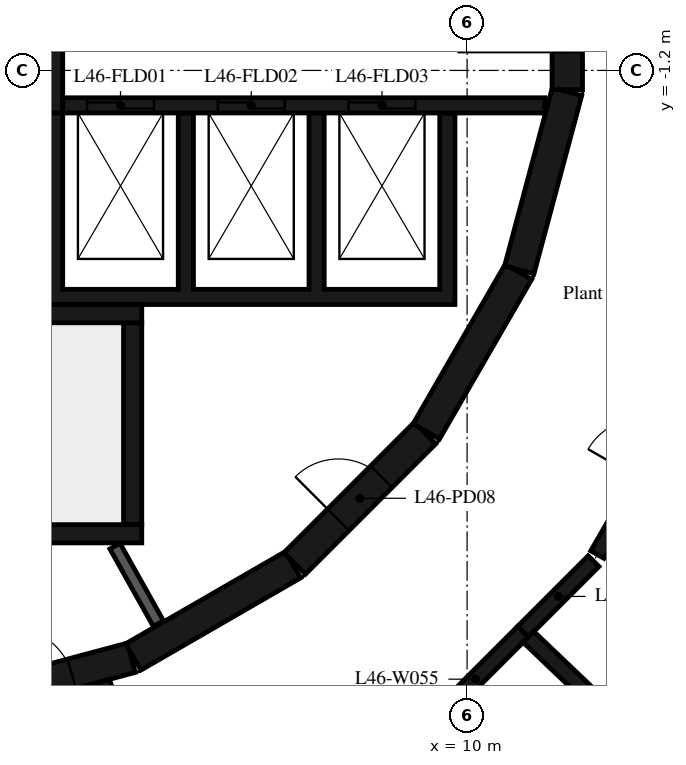
"""IFC4 building model, lengths in metres.
Left out: names, types, materials, properties, quantities, classifications, styles, units other than length and angle.
Written with IfcOpenShell. Run it as: python <this file> out.ifc"""

import sys

from ifc_helpers import new_model, si_unit, direction, frame, frame_2d, origin, place, context, subcontext, project, spatial, polyline, rectangle, outline, extrude, element, fill, save


model = new_model("IFC4")
c1 = context("Model", 3, precision=1e-05, world=origin(), true_north=direction((0.0, 1.0)))
c2 = subcontext(c1, "Body", "Model", "MODEL_VIEW")
j1 = project(units=[si_unit("LENGTHUNIT", "METRE"), si_unit("PLANEANGLEUNIT", "RADIAN")], contexts=[c1])
p1 = place(None, origin())
s1 = spatial("IfcSite", under=j1, at=p1, CompositionType="ELEMENT")
p2 = place(p1, origin())
s2 = spatial("IfcBuilding", under=s1, at=p2, CompositionType="ELEMENT")
p3 = place(p2, frame((0.0, 0.0, 183.2)))
s3 = spatial("IfcBuildingStorey", under=s2, at=p3, CompositionType="ELEMENT", Elevation=183.2)
p4 = place(p3, frame((1.55, -11.643, 0.0), z_axis=(0.0, 0.0, 1.0), x_axis=(0.965948410781, 0.258734743916, 0.0)))
e1 = element("IfcWall", 1, at=p4, inside=s3, PredefinedType="SHEAR", context=c2, shape_type="SweptSolid", body=[
    extrude(rectangle(XDim=3.033, YDim=0.5, at=frame_2d((1.516, 0.0))), origin(), (0.0, 0.0, 1.0), 4.75),
])
p5 = place(p4, frame((1.016, 0.0, 0.0)))
e2 = element("IfcOpeningElement", 2, at=p5, cuts=e1, PredefinedType="OPENING", context=c2, shape_type="SweptSolid", body=[
    extrude(rectangle(XDim=1.0, YDim=2.4, at=frame_2d((0.5, 1.2))), frame((0.0, 0.26, 0.0), z_axis=(0.0, -1.0, 0.0), x_axis=(1.0, 0.0, 0.0)), (0.0, 0.0, 1.0), 0.52),
])
p6 = place(p3, frame((4.51, -10.845, 0.0), z_axis=(0.0, 0.0, 1.0), x_axis=(0.865975092491, 0.500087131594, 0.0)))
e3 = element("IfcWall", 3, at=p6, inside=s3, PredefinedType="SHEAR", context=c2, shape_type="SweptSolid", body=[
    extrude(rectangle(XDim=3.033, YDim=0.5, at=frame_2d((1.516, 0.0))), origin(), (0.0, 0.0, 1.0), 4.75),
])
p7 = place(p3, frame((7.164, -9.308, 0.0), z_axis=(0.0, 0.0, 1.0), x_axis=(0.707106781187, 0.707106781187, 0.0)))
e4 = element("IfcWall", 4, at=p7, inside=s3, PredefinedType="SHEAR", context=c2, shape_type="SweptSolid", body=[
    extrude(rectangle(XDim=3.032, YDim=0.5, at=frame_2d((1.516, 0.0))), origin(), (0.0, 0.0, 1.0), 4.75),
])
p8 = place(p7, frame((1.016, 0.0, 0.0)))
e5 = element("IfcOpeningElement", 5, at=p8, cuts=e4, PredefinedType="OPENING", context=c2, shape_type="SweptSolid", body=[
    extrude(rectangle(XDim=1.0, YDim=2.4, at=frame_2d((0.5, 1.2))), frame((0.0, 0.26, 0.0), z_axis=(0.0, -1.0, 0.0), x_axis=(1.0, 0.0, 0.0)), (0.0, 0.0, 1.0), 0.52),
])
for number, where, z_axis, x_axis in (
    (6, (9.329, -7.137, 0.0), (0.0, 0.0, 1.0), (0.5, 0.866, 0.0)),
    (7, (10.858, -4.479, 0.0), (0.0, 0.0, 1.0), (0.259, 0.966, 0.0)),
):
    element("IfcWall", number, at=place(p3, frame(where, z_axis=z_axis, x_axis=x_axis)), inside=s3, PredefinedType="SHEAR", context=c2, shape_type="SweptSolid", body=[
        extrude(rectangle(XDim=3.033, YDim=0.5, at=frame_2d((1.516, 0.0))), origin(), (0.0, 0.0, 1.0), 4.75),
    ])
p9 = place(p3, frame((11.647, -1.516, 0.0), z_axis=(0.0, 0.0, 1.0), x_axis=(0.0, 1.0, 0.0)))
e8 = element("IfcWall", 8, at=p9, inside=s3, PredefinedType="SHEAR", context=c2, shape_type="SweptSolid", body=[
    extrude(rectangle(XDim=3.033, YDim=0.5, at=frame_2d((1.516, 0.0))), origin(), (0.0, 0.0, 1.0), 4.75),
])
p10 = place(p9, frame((0.616, 0.0, 0.0)))
e9 = element("IfcOpeningElement", 9, at=p10, cuts=e8, PredefinedType="OPENING", context=c2, shape_type="SweptSolid", body=[
    extrude(rectangle(XDim=1.8, YDim=2.1, at=frame_2d((0.9, 1.05))), frame((0.0, 0.26, 0.0), z_axis=(0.0, -1.0, 0.0), x_axis=(1.0, 0.0, 0.0)), (0.0, 0.0, 1.0), 0.52),
])
p11 = place(p3, frame((-2.4, -5.2, 0.0), z_axis=(0.0, 0.0, 1.0), x_axis=(1.0, 0.0, 0.0)))
e10 = element("IfcWall", 10, at=p11, inside=s3, PredefinedType="SHEAR", context=c2, shape_type="SweptSolid", body=[
    extrude(rectangle(XDim=7.05, YDim=0.3, at=frame_2d((3.525, 0.0))), origin(), (0.0, 0.0, 1.0), 4.75),
])
p12 = place(p3, frame((4.5, -8.67, 0.0), z_axis=(0.0, 0.0, 1.0), x_axis=(0.0, 1.0, 0.0)))
e11 = element("IfcWall", 11, at=p12, inside=s3, PredefinedType="SHEAR", context=c2, shape_type="SweptSolid", body=[
    extrude(rectangle(XDim=3.32, YDim=0.3, at=frame_2d((1.66, 0.0))), origin(), (0.0, 0.0, 1.0), 4.75),
])
p13 = place(p3, frame((0.1, -8.82, 0.0), z_axis=(0.0, 0.0, 1.0), x_axis=(1.0, 0.0, 0.0)))
e12 = element("IfcWall", 12, at=p13, inside=s3, PredefinedType="SHEAR", context=c2, shape_type="SweptSolid", body=[
    extrude(rectangle(XDim=4.55, YDim=0.3, at=frame_2d((2.275, 0.0))), origin(), (0.0, 0.0, 1.0), 4.75),
])
p14 = place(p3, origin())
e13 = element("IfcWall", 13, at=p14, inside=s3, PredefinedType="SHEAR", context=c2, shape_type="SweptSolid", body=[
    extrude(outline(polyline([(9.8, -5.05), (9.8, -4.8), (9.8, -1.9), (9.55, -1.9), (9.55, -4.8), (7.65, -4.8), (7.65, -1.9), (7.4, -1.9), (7.4, -4.8), (5.5, -4.8), (5.5, -1.9), (5.25, -1.9), (5.25, -4.8), (3.35, -4.8), (3.35, -1.9), (3.1, -1.9), (3.1, -4.8), (1.2, -4.8), (1.2, -1.9), (0.95, -1.9), (0.95, -4.8), (-0.95, -4.8), (-0.95, -1.9), (-1.2, -1.9), (-1.2, -4.8), (-5.25, -4.8), (-5.25, -1.9), (-5.5, -1.9), (-5.5, -4.8), (-7.4, -4.8), (-7.4, -1.9), (-7.65, -1.9), (-7.65, -4.8), (-9.55, -4.8), (-9.55, -1.9), (-9.8, -1.9), (-9.8, -4.8), (-9.8, -5.05), (9.8, -5.05)])), origin(), (0.0, 0.0, 1.0), 4.75),
])
p15 = place(p3, frame((3.35, -1.775, 0.0), z_axis=(0.0, 0.0, 1.0), x_axis=(1.0, 0.0, 0.0)))
e14 = element("IfcWall", 14, at=p15, inside=s3, PredefinedType="SHEAR", context=c2, shape_type="SweptSolid", body=[
    extrude(rectangle(XDim=7.93, YDim=0.25, at=frame_2d((3.965, 0.0))), origin(), (0.0, 0.0, 1.0), 4.75),
])
p16 = place(p15, frame((0.4, 0.0, 0.0)))
e15 = element("IfcOpeningElement", 15, at=p16, cuts=e14, PredefinedType="OPENING", context=c2, shape_type="SweptSolid", body=[
    extrude(rectangle(XDim=1.1, YDim=2.4, at=frame_2d((0.55, 1.2))), frame((0.0, 0.135, 0.0), z_axis=(0.0, -1.0, 0.0), x_axis=(1.0, 0.0, 0.0)), (0.0, 0.0, 1.0), 0.27),
])
p17 = place(p15, frame((2.55, 0.0, 0.0)))
e16 = element("IfcOpeningElement", 16, at=p17, cuts=e14, PredefinedType="OPENING", context=c2, shape_type="SweptSolid", body=[
    extrude(rectangle(XDim=1.1, YDim=2.4, at=frame_2d((0.55, 1.2))), frame((0.0, 0.135, 0.0), z_axis=(0.0, -1.0, 0.0), x_axis=(1.0, 0.0, 0.0)), (0.0, 0.0, 1.0), 0.27),
])
p18 = place(p15, frame((4.7, 0.0, 0.0)))
e17 = element("IfcOpeningElement", 17, at=p18, cuts=e14, PredefinedType="OPENING", context=c2, shape_type="SweptSolid", body=[
    extrude(rectangle(XDim=1.1, YDim=2.4, at=frame_2d((0.55, 1.2))), frame((0.0, 0.135, 0.0), z_axis=(0.0, -1.0, 0.0), x_axis=(1.0, 0.0, 0.0)), (0.0, 0.0, 1.0), 0.27),
])
p19 = place(p3, frame((3.225, -1.9, 0.0), z_axis=(0.0, 0.0, 1.0), x_axis=(0.0, 1.0, 0.0)))
e18 = element("IfcWall", 18, at=p19, inside=s3, PredefinedType="SHEAR", context=c2, shape_type="SweptSolid", body=[
    extrude(rectangle(XDim=3.8, YDim=0.25, at=frame_2d((1.9, 0.0))), origin(), (0.0, 0.0, 1.0), 4.75),
])
p20 = place(p3, frame((4.922, -10.296, 0.0), z_axis=(0.0, 0.0, 1.0), x_axis=(-0.48860846254, 0.872503163509, 0.0)))
e19 = element("IfcWall", 19, at=p20, inside=s3, PredefinedType="PARTITIONING", context=c2, shape_type="SweptSolid", body=[
    extrude(rectangle(XDim=1.459, YDim=0.19, at=frame_2d((0.73, 0.0))), origin(), (0.0, 0.0, 1.0), 4.75),
])
p21 = place(p3, frame((4.02, -11.24, 0.0), z_axis=(0.0, 0.0, 1.0), x_axis=(0.336751058688, -0.941593715183, 0.0)))
e20 = element("IfcWall", 20, at=p21, inside=s3, PredefinedType="PARTITIONING", context=c2, shape_type="SweptSolid", body=[
    extrude(rectangle(XDim=3.207, YDim=0.2, at=frame_2d((1.604, 0.0))), origin(), (0.0, 0.0, 1.0), 4.75),
])
p22 = place(p21, frame((1.004, 0.0, 0.0)))
e21 = element("IfcOpeningElement", 21, at=p22, cuts=e20, PredefinedType="OPENING", context=c2, shape_type="SweptSolid", body=[
    extrude(rectangle(XDim=1.2, YDim=2.1, at=frame_2d((0.6, 1.05))), frame((0.0, 0.11, 0.0), z_axis=(0.0, -1.0, 0.0), x_axis=(1.0, 0.0, 0.0)), (0.0, 0.0, 1.0), 0.22),
])
p23 = place(p3, frame((9.358, -11.992, 0.0), z_axis=(0.0, 0.0, 1.0), x_axis=(0.707051506082, 0.707162051971, 0.0)))
e22 = element("IfcWall", 22, at=p23, inside=s3, PredefinedType="PARTITIONING", context=c2, shape_type="SweptSolid", body=[
    extrude(rectangle(XDim=2.208, YDim=0.25, at=frame_2d((1.104, 0.0))), origin(), (0.0, 0.0, 1.0), 4.75),
])
p24 = place(p3, frame((10.92, -10.43, 0.0), z_axis=(0.0, 0.0, 1.0), x_axis=(0.707181186066, 0.707032368477, 0.0)))
e23 = element("IfcWall", 23, at=p24, inside=s3, PredefinedType="PARTITIONING", context=c2, shape_type="SweptSolid", body=[
    extrude(rectangle(XDim=1.641, YDim=0.25, at=frame_2d((0.82, 0.0))), origin(), (0.0, 0.0, 1.0), 4.75),
])
p25 = place(p3, frame((11.01, -10.516, 0.0), z_axis=(0.0, 0.0, 1.0), x_axis=(0.723696518253, -0.690118359029, 0.0)))
e24 = element("IfcWall", 24, at=p25, inside=s3, PredefinedType="PARTITIONING", context=c2, shape_type="SweptSolid", body=[
    extrude(rectangle(XDim=5.46, YDim=0.25, at=frame_2d((2.73, 0.0))), origin(), (0.0, 0.0, 1.0), 4.75),
])
p26 = place(p3, frame((12.143, -9.162, 0.0), z_axis=(0.0, 0.0, 1.0), x_axis=(0.500756218026, 0.865588360659, 0.0)))
e25 = element("IfcWall", 25, at=p26, inside=s3, PredefinedType="PARTITIONING", context=c2, shape_type="SweptSolid", body=[
    extrude(rectangle(XDim=3.849, YDim=0.25, at=frame_2d((1.925, 0.0))), origin(), (0.0, 0.0, 1.0), 4.75),
])
p27 = place(p26, frame((1.425, 0.0, 0.0)))
e26 = element("IfcOpeningElement", 26, at=p27, cuts=e25, PredefinedType="OPENING", context=c2, shape_type="SweptSolid", body=[
    extrude(rectangle(XDim=1.0, YDim=2.1, at=frame_2d((0.5, 1.05))), frame((0.0, 0.135, 0.0), z_axis=(0.0, -1.0, 0.0), x_axis=(1.0, 0.0, 0.0)), (0.0, 0.0, 1.0), 0.27),
])
p28 = place(p10, origin())
e27 = element("IfcDoor", 27, at=p28, inside=s3, OperationType="DOUBLE_DOOR_SINGLE_SWING", PredefinedType="DOOR", context=c2, shape_type="SweptSolid", body=[
    extrude(rectangle(XDim=1.8, YDim=2.1, at=frame_2d((0.9, 1.05))), frame((0.0, 0.025, 0.0), z_axis=(0.0, -1.0, 0.0), x_axis=(1.0, 0.0, 0.0)), (0.0, 0.0, 1.0), 0.05),
])
fill(e9, e27)
p29 = place(p16, origin())
e28 = element("IfcDoor", 28, at=p29, inside=s3, OperationType="DOUBLE_DOOR_SLIDING", PredefinedType="DOOR", context=c2, shape_type="SweptSolid", body=[
    extrude(rectangle(XDim=1.1, YDim=2.4, at=frame_2d((0.55, 1.2))), frame((0.0, 0.025, 0.0), z_axis=(0.0, -1.0, 0.0), x_axis=(1.0, 0.0, 0.0)), (0.0, 0.0, 1.0), 0.05),
])
fill(e15, e28)
p30 = place(p17, origin())
e29 = element("IfcDoor", 29, at=p30, inside=s3, OperationType="DOUBLE_DOOR_SLIDING", PredefinedType="DOOR", context=c2, shape_type="SweptSolid", body=[
    extrude(rectangle(XDim=1.1, YDim=2.4, at=frame_2d((0.55, 1.2))), frame((0.0, 0.025, 0.0), z_axis=(0.0, -1.0, 0.0), x_axis=(1.0, 0.0, 0.0)), (0.0, 0.0, 1.0), 0.05),
])
fill(e16, e29)
p31 = place(p18, origin())
e30 = element("IfcDoor", 30, at=p31, inside=s3, OperationType="DOUBLE_DOOR_SLIDING", PredefinedType="DOOR", context=c2, shape_type="SweptSolid", body=[
    extrude(rectangle(XDim=1.1, YDim=2.4, at=frame_2d((0.55, 1.2))), frame((0.0, 0.025, 0.0), z_axis=(0.0, -1.0, 0.0), x_axis=(1.0, 0.0, 0.0)), (0.0, 0.0, 1.0), 0.05),
])
fill(e17, e30)
p32 = place(p8, origin())
e31 = element("IfcDoor", 31, at=p32, inside=s3, OperationType="SINGLE_SWING_RIGHT", PredefinedType="DOOR", context=c2, shape_type="SweptSolid", body=[
    extrude(rectangle(XDim=1.0, YDim=2.4, at=frame_2d((0.5, 1.2))), frame((0.0, 0.025, 0.0), z_axis=(0.0, -1.0, 0.0), x_axis=(1.0, 0.0, 0.0)), (0.0, 0.0, 1.0), 0.05),
])
fill(e5, e31)
p33 = place(p5, origin())
e32 = element("IfcDoor", 32, at=p33, inside=s3, OperationType="SINGLE_SWING_LEFT", PredefinedType="DOOR", context=c2, shape_type="SweptSolid", body=[
    extrude(rectangle(XDim=1.0, YDim=2.4, at=frame_2d((0.5, 1.2))), frame((0.0, 0.025, 0.0), z_axis=(0.0, -1.0, 0.0), x_axis=(1.0, 0.0, 0.0)), (0.0, 0.0, 1.0), 0.05),
])
fill(e2, e32)
save(model, sys.argv[1])
